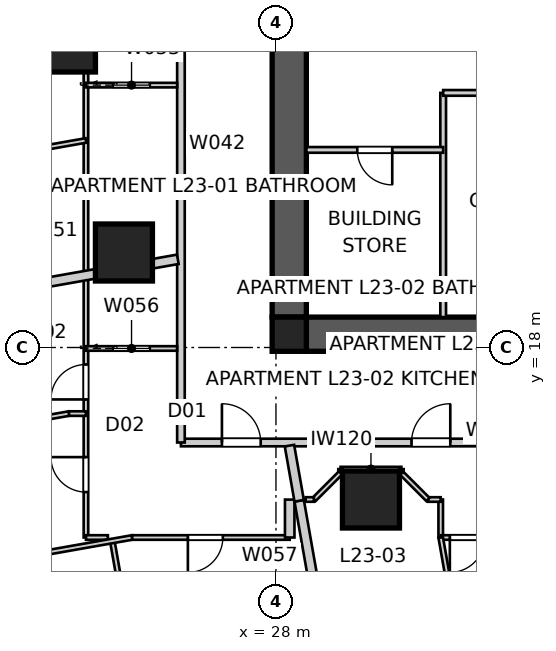
"""IFC4 building model, lengths in metres.
Left out: names, types, materials, properties, quantities, classifications, styles, units other than length and angle.
Written with IfcOpenShell. Run it as: python <this file> out.ifc"""

import sys

from ifc_helpers import new_model, si_unit, direction, frame, frame_2d, origin, origin_2d, place, context, subcontext, project, spatial, polyline, rectangle, outline, extrude, element, fill, save


model = new_model("IFC4")
c1 = context("Model", 3, precision=1e-05, world=origin(), true_north=direction((0.0, 1.0)))
c2 = subcontext(c1, "Body", "Model", "MODEL_VIEW")
j1 = project(units=[si_unit("LENGTHUNIT", "METRE"), si_unit("PLANEANGLEUNIT", "RADIAN")], contexts=[c1])
p1 = place(None, origin())
s1 = spatial("IfcSite", under=j1, at=p1, CompositionType="ELEMENT")
p2 = place(p1, origin())
s2 = spatial("IfcBuilding", under=s1, at=p2, CompositionType="ELEMENT")
p3 = place(p2, frame((0.0, 0.0, 86.2)))
s3 = spatial("IfcBuildingStorey", under=s2, at=p3, CompositionType="ELEMENT", Elevation=86.2)
p4 = place(p3, frame((51.2, 18.35, 0.0), z_axis=(0.0, 0.0, 1.0), x_axis=(-1.0, 0.0, 0.0)))
e1 = element("IfcWall", 1, at=p4, inside=s3, PredefinedType="SHEAR", context=c2, shape_type="SweptSolid", body=[
    extrude(outline(polyline([(0.0, -0.45), (22.4, -0.45), (22.4, -0.025), (22.85, -0.025), (22.85, 0.025), (22.4, 0.025), (22.4, 0.45), (0.0, 0.45), (0.0, 0.025), (-0.45, 0.025), (-0.45, -0.025), (0.0, -0.025), (0.0, -0.45)])), origin(), (0.0, 0.0, 1.0), 3.4),
])
p5 = place(p3, frame((28.35, 41.2, 0.0), z_axis=(0.0, 0.0, 1.0), x_axis=(0.0, -1.0, 0.0)))
e2 = element("IfcWall", 2, at=p5, inside=s3, PredefinedType="SHEAR", context=c2, shape_type="SweptSolid", body=[
    extrude(outline(polyline([(0.0, -0.45), (22.4, -0.45), (22.4, -0.025), (22.85, -0.025), (22.85, 0.025), (22.4, 0.025), (22.4, 0.45), (0.0, 0.45), (0.0, 0.025), (-0.45, 0.025), (-0.45, -0.025), (0.0, -0.025), (0.0, -0.45)])), origin(), (0.0, 0.0, 1.0), 3.4),
])
p6 = place(p5, frame((11.14, 0.0, 0.0)))
e3 = element("IfcOpeningElement", 3, at=p6, cuts=e2, PredefinedType="OPENING", context=c2, shape_type="SweptSolid", body=[
    extrude(rectangle(XDim=1.02, YDim=2.4, at=frame_2d((0.51, 1.2))), frame((0.0, 0.46, 0.0), z_axis=(0.0, -1.0, 0.0), x_axis=(1.0, 0.0, 0.0)), (0.0, 0.0, 1.0), 0.92),
])
p7 = place(p3, frame((28.35, 18.35, 0.0), z_axis=(0.0, 0.0, 1.0), x_axis=(1.0, 0.0, 0.0)))
e4 = element("IfcColumn", 4, at=p7, inside=s3, PredefinedType="COLUMN", context=c2, shape_type="SweptSolid", body=[
    extrude(rectangle(XDim=0.9, YDim=0.9, at=origin_2d()), origin(), (0.0, 0.0, 1.0), 3.4),
])
for number, where, z_axis, x_axis in (
    (5, (22.5, 26.0, 0.0), (0.0, 0.0, 1.0), (1.0, 0.0, 0.0)),
    (6, (24.0, 20.5, 0.0), (0.0, 0.0, 1.0), (1.0, 0.0, 0.0)),
    (7, (30.5, 14.0, 0.0), (0.0, 0.0, 1.0), (1.0, 0.0, 0.0)),
):
    element("IfcColumn", number, at=place(p3, frame(where, z_axis=z_axis, x_axis=x_axis)), inside=s3, PredefinedType="COLUMN", context=c2, shape_type="SweptSolid", body=[
        extrude(rectangle(XDim=1.5, YDim=1.5, at=origin_2d()), origin(), (0.0, 0.0, 1.0), 3.4),
    ])
p8 = place(p3, frame((25.5, 15.5, 0.0), z_axis=(0.0, 0.0, 1.0), x_axis=(1.0, 0.0, 0.0)))
e8 = element("IfcWall", 8, at=p8, inside=s3, PredefinedType="PARTITIONING", context=c2, shape_type="SweptSolid", body=[
    extrude(rectangle(XDim=29.0, YDim=0.2, at=frame_2d((14.5, 0.0))), origin(), (0.0, 0.0, 1.0), 3.25),
])
p9 = place(p8, frame((15.794, 0.0, 0.0)))
e9 = element("IfcOpeningElement", 9, at=p9, cuts=e8, PredefinedType="OPENING", context=c2, shape_type="SweptSolid", body=[
    extrude(rectangle(XDim=1.02, YDim=2.34, at=frame_2d((0.51, 1.17))), frame((0.0, 0.11, 0.0), z_axis=(0.0, -1.0, 0.0), x_axis=(1.0, 0.0, 0.0)), (0.0, 0.0, 1.0), 0.22),
])
p10 = place(p8, frame((6.067, 0.0, 0.0)))
e10 = element("IfcOpeningElement", 10, at=p10, cuts=e8, PredefinedType="OPENING", context=c2, shape_type="SweptSolid", body=[
    extrude(rectangle(XDim=1.02, YDim=2.34, at=frame_2d((0.51, 1.17))), frame((0.0, 0.11, 0.0), z_axis=(0.0, -1.0, 0.0), x_axis=(1.0, 0.0, 0.0)), (0.0, 0.0, 1.0), 0.22),
])
p11 = place(p8, frame((1.079, 0.0, 0.0)))
e11 = element("IfcOpeningElement", 11, at=p11, cuts=e8, PredefinedType="OPENING", context=c2, shape_type="SweptSolid", body=[
    extrude(rectangle(XDim=1.02, YDim=2.34, at=frame_2d((0.51, 1.17))), frame((0.0, 0.11, 0.0), z_axis=(0.0, -1.0, 0.0), x_axis=(1.0, 0.0, 0.0)), (0.0, 0.0, 1.0), 0.22),
])
p12 = place(p3, frame((25.5, 44.5, 0.0), z_axis=(0.0, 0.0, 1.0), x_axis=(0.0, -1.0, 0.0)))
e12 = element("IfcWall", 12, at=p12, inside=s3, PredefinedType="PARTITIONING", context=c2, shape_type="SweptSolid", body=[
    extrude(rectangle(XDim=29.0, YDim=0.2, at=frame_2d((14.5, 0.0))), origin(), (0.0, 0.0, 1.0), 3.25),
])
p13 = place(p12, frame((12.263, 0.0, 0.0)))
e13 = element("IfcOpeningElement", 13, at=p13, cuts=e12, PredefinedType="OPENING", context=c2, shape_type="SweptSolid", body=[
    extrude(rectangle(XDim=1.02, YDim=2.34, at=frame_2d((0.51, 1.17))), frame((0.0, 0.11, 0.0), z_axis=(0.0, -1.0, 0.0), x_axis=(1.0, 0.0, 0.0)), (0.0, 0.0, 1.0), 0.22),
])
p14 = place(p12, frame((2.018, 0.0, 0.0)))
e14 = element("IfcOpeningElement", 14, at=p14, cuts=e12, PredefinedType="OPENING", context=c2, shape_type="SweptSolid", body=[
    extrude(rectangle(XDim=1.02, YDim=2.34, at=frame_2d((0.51, 1.17))), frame((0.0, 0.11, 0.0), z_axis=(0.0, -1.0, 0.0), x_axis=(1.0, 0.0, 0.0)), (0.0, 0.0, 1.0), 0.22),
])
p15 = place(p3, frame((16.595, 18.765, 0.0), z_axis=(0.0, 0.0, 1.0), x_axis=(0.984806596137, 0.173654738504, 0.0)))
e15 = element("IfcWall", 15, at=p15, inside=s3, PredefinedType="PARTITIONING", context=c2, shape_type="SweptSolid", body=[
    extrude(rectangle(XDim=8.958, YDim=0.25, at=frame_2d((4.479, 0.0))), origin(), (0.0, 0.0, 1.0), 3.25),
])
p16 = place(p3, frame((30.38, 3.934, 0.0), z_axis=(0.0, 0.0, 1.0), x_axis=(-0.173644522411, 0.984808397525, 0.0)))
e16 = element("IfcWall", 16, at=p16, inside=s3, PredefinedType="PARTITIONING", context=c2, shape_type="SweptSolid", body=[
    extrude(rectangle(XDim=10.188, YDim=0.25, at=frame_2d((5.094, 0.0))), origin(), (0.0, 0.0, 1.0), 2.638),
])
p17 = place(p3, frame((28.611, 13.967, 0.0), z_axis=(0.0, 0.0, 1.0), x_axis=(-0.173634105885, 0.984810234143, 0.0)))
e17 = element("IfcWall", 17, at=p17, inside=s3, PredefinedType="PARTITIONING", context=c2, shape_type="SweptSolid", body=[
    extrude(rectangle(XDim=1.474, YDim=0.25, at=frame_2d((0.737, 0.0))), origin(), (0.0, 0.0, 1.0), 3.25),
])
p18 = place(p3, frame((32.4, 18.8, 0.0), z_axis=(0.0, 0.0, 1.0), x_axis=(0.0, 1.0, 0.0)))
e18 = element("IfcWall", 18, at=p18, inside=s3, PredefinedType="SOLIDWALL", context=c2, shape_type="SweptSolid", body=[
    extrude(rectangle(XDim=5.9, YDim=0.15, at=frame_2d((2.95, 0.0))), origin(), (0.0, 0.0, 1.0), 3.25),
])
p19 = place(p3, frame((32.4, 24.7, 0.0), z_axis=(0.0, 0.0, 1.0), x_axis=(1.0, 0.0, 0.0)))
e19 = element("IfcWall", 19, at=p19, inside=s3, PredefinedType="SOLIDWALL", context=c2, shape_type="SweptSolid", body=[
    extrude(rectangle(XDim=1.85, YDim=0.15, at=frame_2d((0.925, 0.0))), origin(), (0.0, 0.0, 1.0), 3.25),
])
p20 = place(p3, frame((32.4, 23.2, 0.0), z_axis=(0.0, 0.0, 1.0), x_axis=(-1.0, 0.0, 0.0)))
e20 = element("IfcWall", 20, at=p20, inside=s3, PredefinedType="SOLIDWALL", context=c2, shape_type="SweptSolid", body=[
    extrude(rectangle(XDim=3.6, YDim=0.15, at=frame_2d((1.8, 0.0))), origin(), (0.0, 0.0, 1.0), 3.25),
])
p21 = place(p20, frame((1.34, 0.0, 0.0)))
e21 = element("IfcOpeningElement", 21, at=p21, cuts=e20, PredefinedType="OPENING", context=c2, shape_type="SweptSolid", body=[
    extrude(rectangle(XDim=0.92, YDim=2.1, at=frame_2d((0.46, 1.05))), frame((0.0, 0.085, 0.0), z_axis=(0.0, -1.0, 0.0), x_axis=(1.0, 0.0, 0.0)), (0.0, 0.0, 1.0), 0.17),
])
p22 = place(p3, frame((23.0, 13.0, 0.0), z_axis=(0.0, 0.0, 1.0), x_axis=(0.0, 1.0, 0.0)))
e22 = element("IfcWall", 22, at=p22, inside=s3, PredefinedType="PARTITIONING", context=c2, shape_type="SweptSolid", body=[
    extrude(rectangle(XDim=34.0, YDim=0.12, at=frame_2d((17.0, 0.0))), origin(), (0.0, 0.0, 1.0), 2.55),
])
p23 = place(p22, frame((18.848, 0.0, 0.0)))
e23 = element("IfcOpeningElement", 23, at=p23, cuts=e22, PredefinedType="OPENING", context=c2, shape_type="SweptSolid", body=[
    extrude(rectangle(XDim=0.92, YDim=2.34, at=frame_2d((0.46, 1.17))), frame((0.0, 0.07, 0.0), z_axis=(0.0, -1.0, 0.0), x_axis=(1.0, 0.0, 0.0)), (0.0, 0.0, 1.0), 0.14),
])
p24 = place(p22, frame((16.284, 0.0, 0.0)))
e24 = element("IfcOpeningElement", 24, at=p24, cuts=e22, PredefinedType="OPENING", context=c2, shape_type="SweptSolid", body=[
    extrude(rectangle(XDim=0.92, YDim=2.34, at=frame_2d((0.46, 1.17))), frame((0.0, 0.07, 0.0), z_axis=(0.0, -1.0, 0.0), x_axis=(1.0, 0.0, 0.0)), (0.0, 0.0, 1.0), 0.14),
])
p25 = place(p22, frame((29.052, 0.0, 0.0)))
e25 = element("IfcOpeningElement", 25, at=p25, cuts=e22, PredefinedType="OPENING", context=c2, shape_type="SweptSolid", body=[
    extrude(rectangle(XDim=0.92, YDim=2.34, at=frame_2d((0.46, 1.17))), frame((0.0, 0.07, 0.0), z_axis=(0.0, -1.0, 0.0), x_axis=(1.0, 0.0, 0.0)), (0.0, 0.0, 1.0), 0.14),
])
p26 = place(p22, frame((1.196, 0.0, 0.0)))
e26 = element("IfcOpeningElement", 26, at=p26, cuts=e22, PredefinedType="OPENING", context=c2, shape_type="SweptSolid", body=[
    extrude(rectangle(XDim=0.92, YDim=2.34, at=frame_2d((0.46, 1.17))), frame((0.0, 0.07, 0.0), z_axis=(0.0, -1.0, 0.0), x_axis=(1.0, 0.0, 0.0)), (0.0, 0.0, 1.0), 0.14),
])
p27 = place(p22, frame((3.633, 0.0, 0.0)))
e27 = element("IfcOpeningElement", 27, at=p27, cuts=e22, PredefinedType="OPENING", context=c2, shape_type="SweptSolid", body=[
    extrude(rectangle(XDim=0.92, YDim=2.34, at=frame_2d((0.46, 1.17))), frame((0.0, 0.07, 0.0), z_axis=(0.0, -1.0, 0.0), x_axis=(1.0, 0.0, 0.0)), (0.0, 0.0, 1.0), 0.14),
])
p28 = place(p22, frame((23.619, 0.0, 0.0)))
e28 = element("IfcOpeningElement", 28, at=p28, cuts=e22, PredefinedType="OPENING", context=c2, shape_type="SweptSolid", body=[
    extrude(rectangle(XDim=0.96, YDim=2.1, at=frame_2d((0.48, 1.05))), frame((0.0, 0.07, 0.0), z_axis=(0.0, -1.0, 0.0), x_axis=(1.0, 0.0, 0.0)), (0.0, 0.0, 1.0), 0.14),
])
p29 = place(p3, frame((23.0, 24.905, 0.0), z_axis=(0.0, 0.0, 1.0), x_axis=(1.0, 0.0, 0.0)))
e29 = element("IfcWall", 29, at=p29, inside=s3, PredefinedType="PARTITIONING", context=c2, shape_type="SweptSolid", body=[
    extrude(rectangle(XDim=2.4, YDim=0.12, at=frame_2d((1.2, 0.0))), origin(), (0.0, 0.0, 1.0), 3.25),
])
p30 = place(p29, frame((0.72, 0.0, 0.0)))
e30 = element("IfcOpeningElement", 30, at=p30, cuts=e29, PredefinedType="OPENING", context=c2, shape_type="SweptSolid", body=[
    extrude(rectangle(XDim=0.96, YDim=2.1, at=frame_2d((0.48, 1.05))), frame((0.0, 0.07, 0.0), z_axis=(0.0, -1.0, 0.0), x_axis=(1.0, 0.0, 0.0)), (0.0, 0.0, 1.0), 0.14),
])
p31 = place(p3, frame((23.0, 23.448, 0.0), z_axis=(0.0, 0.0, 1.0), x_axis=(-0.984809234282, -0.173639776761, 0.0)))
e31 = element("IfcWall", 31, at=p31, inside=s3, PredefinedType="PARTITIONING", context=c2, shape_type="SweptSolid", body=[
    extrude(rectangle(XDim=7.081, YDim=0.12, at=frame_2d((3.541, 0.0))), origin(), (0.0, 0.0, 1.0), 3.25),
])
p32 = place(p31, frame((3.1, 0.0, 0.0)))
e32 = element("IfcOpeningElement", 32, at=p32, cuts=e31, PredefinedType="OPENING", context=c2, shape_type="SweptSolid", body=[
    extrude(rectangle(XDim=0.92, YDim=2.34, at=frame_2d((0.46, 1.17))), frame((0.0, 0.07, 0.0), z_axis=(0.0, -1.0, 0.0), x_axis=(1.0, 0.0, 0.0)), (0.0, 0.0, 1.0), 0.14),
])
p33 = place(p3, frame((23.0, 17.975, 0.0), z_axis=(0.0, 0.0, 1.0), x_axis=(1.0, 0.0, 0.0)))
e33 = element("IfcWall", 33, at=p33, inside=s3, PredefinedType="PARTITIONING", context=c2, shape_type="SweptSolid", body=[
    extrude(rectangle(XDim=2.4, YDim=0.12, at=frame_2d((1.2, 0.0))), origin(), (0.0, 0.0, 1.0), 3.25),
])
p34 = place(p33, frame((0.72, 0.0, 0.0)))
e34 = element("IfcOpeningElement", 34, at=p34, cuts=e33, PredefinedType="OPENING", context=c2, shape_type="SweptSolid", body=[
    extrude(rectangle(XDim=0.96, YDim=2.1, at=frame_2d((0.48, 1.05))), frame((0.0, 0.07, 0.0), z_axis=(0.0, -1.0, 0.0), x_axis=(1.0, 0.0, 0.0)), (0.0, 0.0, 1.0), 0.14),
])
p35 = place(p3, frame((28.362, 13.0, 0.0), z_axis=(0.0, 0.0, 1.0), x_axis=(-1.0, 0.0, 0.0)))
e35 = element("IfcWall", 35, at=p35, inside=s3, PredefinedType="PARTITIONING", context=c2, shape_type="SweptSolid", body=[
    extrude(rectangle(XDim=4.151, YDim=0.12, at=frame_2d((2.076, 0.0))), origin(), (0.0, 0.0, 1.0), 2.638),
])
p36 = place(p35, frame((1.76, 0.0, 0.0)))
e36 = element("IfcOpeningElement", 36, at=p36, cuts=e35, PredefinedType="OPENING", context=c2, shape_type="SweptSolid", body=[
    extrude(rectangle(XDim=0.92, YDim=2.34, at=frame_2d((0.46, 1.17))), frame((0.0, 0.07, 0.0), z_axis=(0.0, -1.0, 0.0), x_axis=(1.0, 0.0, 0.0)), (0.0, 0.0, 1.0), 0.14),
])
p37 = place(p3, frame((28.362, 13.998, 0.0), z_axis=(0.0, 0.0, 1.0), x_axis=(0.0, -1.0, 0.0)))
e37 = element("IfcWall", 37, at=p37, inside=s3, PredefinedType="PARTITIONING", context=c2, shape_type="SweptSolid", body=[
    extrude(rectangle(XDim=0.998, YDim=0.25, at=frame_2d((0.499, 0.0))), origin(), (0.0, 0.0, 1.0), 3.25),
])
p38 = place(p3, frame((25.597, 2.115, 0.0), z_axis=(0.0, 0.0, 1.0), x_axis=(-0.173639194339, 0.984809336973, 0.0)))
e38 = element("IfcWall", 38, at=p38, inside=s3, PredefinedType="PARTITIONING", context=c2, shape_type="SweptSolid", body=[
    extrude(rectangle(XDim=10.96, YDim=0.12, at=frame_2d((5.48, 0.0))), origin(), (0.0, 0.0, 1.0), 3.25),
])
p39 = place(p38, frame((3.275, 0.0, 0.0)))
e39 = element("IfcOpeningElement", 39, at=p39, cuts=e38, PredefinedType="OPENING", context=c2, shape_type="SweptSolid", body=[
    extrude(rectangle(XDim=0.92, YDim=2.34, at=frame_2d((0.46, 1.17))), frame((0.0, 0.07, 0.0), z_axis=(0.0, -1.0, 0.0), x_axis=(1.0, 0.0, 0.0)), (0.0, 0.0, 1.0), 0.14),
])
p40 = place(p38, frame((8.725, 0.0, 0.0)))
e40 = element("IfcOpeningElement", 40, at=p40, cuts=e38, PredefinedType="OPENING", context=c2, shape_type="SweptSolid", body=[
    extrude(rectangle(XDim=0.92, YDim=2.34, at=frame_2d((0.46, 1.17))), frame((0.0, 0.07, 0.0), z_axis=(0.0, -1.0, 0.0), x_axis=(1.0, 0.0, 0.0)), (0.0, 0.0, 1.0), 0.14),
])
p41 = place(p3, frame((17.85, 11.878, 0.0), z_axis=(0.0, 0.0, 1.0), x_axis=(0.984806762864, 0.173653792983, 0.0)))
e41 = element("IfcWall", 41, at=p41, inside=s3, PredefinedType="PARTITIONING", context=c2, shape_type="SweptSolid", body=[
    extrude(rectangle(XDim=6.459, YDim=0.12, at=frame_2d((3.229, 0.0))), origin(), (0.0, 0.0, 1.0), 2.638),
])
p42 = place(p3, frame((23.0, 16.261, 0.0), z_axis=(0.0, 0.0, 1.0), x_axis=(-1.0, 0.0, 0.0)))
e42 = element("IfcWall", 42, at=p42, inside=s3, PredefinedType="PARTITIONING", context=c2, shape_type="SweptSolid", body=[
    extrude(rectangle(XDim=0.45, YDim=0.12, at=frame_2d((0.225, 0.0))), origin(), (0.0, 0.0, 1.0), 3.25),
])
p43 = place(p3, frame((22.55, 16.261, 0.0), z_axis=(0.0, 0.0, 1.0), x_axis=(-0.984810453076, -0.173632864151, 0.0)))
e43 = element("IfcWall", 43, at=p43, inside=s3, PredefinedType="PARTITIONING", context=c2, shape_type="SweptSolid", body=[
    extrude(rectangle(XDim=5.389, YDim=0.12, at=frame_2d((2.695, 0.0))), origin(), (0.0, 0.0, 1.0), 3.25),
])
p44 = place(p3, frame((32.336, 13.0, 0.0), z_axis=(0.0, 0.0, 1.0), x_axis=(0.0, 1.0, 0.0)))
e44 = element("IfcWall", 44, at=p44, inside=s3, PredefinedType="PARTITIONING", context=c2, shape_type="SweptSolid", body=[
    extrude(rectangle(XDim=1.0, YDim=0.12, at=frame_2d((0.5, 0.0))), origin(), (0.0, 0.0, 1.0), 3.25),
])
p45 = place(p3, frame((32.336, 14.0, 0.0), z_axis=(0.0, 0.0, 1.0), x_axis=(-1.0, 0.0, 0.0)))
e45 = element("IfcWall", 45, at=p45, inside=s3, PredefinedType="PARTITIONING", context=c2, shape_type="SweptSolid", body=[
    extrude(rectangle(XDim=0.336, YDim=0.12, at=frame_2d((0.168, 0.0))), origin(), (0.0, 0.0, 1.0), 3.25),
])
p46 = place(p3, frame((32.0, 14.0, 0.0), z_axis=(0.0, 0.0, 1.0), x_axis=(-0.707106781187, 0.707106781187, 0.0)))
e46 = element("IfcWall", 46, at=p46, inside=s3, PredefinedType="PARTITIONING", context=c2, shape_type="SweptSolid", body=[
    extrude(rectangle(XDim=0.99, YDim=0.12, at=frame_2d((0.495, 0.0))), origin(), (0.0, 0.0, 1.0), 3.25),
])
p47 = place(p3, frame((31.3, 14.8, 0.0), z_axis=(0.0, 0.0, 1.0), x_axis=(-1.0, 0.0, 0.0)))
e47 = element("IfcWall", 47, at=p47, inside=s3, PredefinedType="PARTITIONING", context=c2, shape_type="SweptSolid", body=[
    extrude(rectangle(XDim=1.6, YDim=0.12, at=frame_2d((0.8, 0.0))), origin(), (0.0, 0.0, 1.0), 3.25),
])
p48 = place(p3, frame((29.7, 14.7, 0.0), z_axis=(0.0, 0.0, 1.0), x_axis=(-0.707106781187, -0.707106781187, 0.0)))
e48 = element("IfcWall", 48, at=p48, inside=s3, PredefinedType="PARTITIONING", context=c2, shape_type="SweptSolid", body=[
    extrude(rectangle(XDim=0.99, YDim=0.12, at=frame_2d((0.495, 0.0))), origin(), (0.0, 0.0, 1.0), 3.25),
])
p49 = place(p3, frame((29.0, 14.0, 0.0), z_axis=(0.0, 0.0, 1.0), x_axis=(-1.0, 0.0, 0.0)))
e49 = element("IfcWall", 49, at=p49, inside=s3, PredefinedType="PARTITIONING", context=c2, shape_type="SweptSolid", body=[
    extrude(rectangle(XDim=0.219, YDim=0.12, at=frame_2d((0.109, 0.0))), origin(), (0.0, 0.0, 1.0), 3.25),
])
p50 = place(p3, frame((50.105, 13.0, 0.0), z_axis=(0.0, 0.0, 1.0), x_axis=(-1.0, 0.0, 0.0)))
e50 = element("IfcWall", 50, at=p50, inside=s3, PredefinedType="PARTITIONING", context=c2, shape_type="SweptSolid", body=[
    extrude(rectangle(XDim=17.77, YDim=0.12, at=frame_2d((8.885, 0.0))), origin(), (0.0, 0.0, 1.0), 2.55),
])
p51 = place(p50, frame((7.626, 0.0, 0.0)))
e51 = element("IfcOpeningElement", 51, at=p51, cuts=e50, PredefinedType="OPENING", context=c2, shape_type="SweptSolid", body=[
    extrude(rectangle(XDim=0.92, YDim=2.34, at=frame_2d((0.46, 1.17))), frame((0.0, 0.07, 0.0), z_axis=(0.0, -1.0, 0.0), x_axis=(1.0, 0.0, 0.0)), (0.0, 0.0, 1.0), 0.14),
])
p52 = place(p50, frame((16.61, 0.0, 0.0)))
e52 = element("IfcOpeningElement", 52, at=p52, cuts=e50, PredefinedType="OPENING", context=c2, shape_type="SweptSolid", body=[
    extrude(rectangle(XDim=0.92, YDim=2.34, at=frame_2d((0.46, 1.17))), frame((0.0, 0.07, 0.0), z_axis=(0.0, -1.0, 0.0), x_axis=(1.0, 0.0, 0.0)), (0.0, 0.0, 1.0), 0.14),
])
p53 = place(p3, frame((32.336, 13.0, 0.0), z_axis=(0.0, 0.0, 1.0), x_axis=(0.173624894944, -0.984811858101, 0.0)))
e53 = element("IfcWall", 53, at=p53, inside=s3, PredefinedType="PARTITIONING", context=c2, shape_type="SweptSolid", body=[
    extrude(rectangle(XDim=9.549, YDim=0.12, at=frame_2d((4.774, 0.0))), origin(), (0.0, 0.0, 1.0), 3.25),
])
p54 = place(p53, frame((4.334, 0.0, 0.0)))
e54 = element("IfcOpeningElement", 54, at=p54, cuts=e53, PredefinedType="OPENING", context=c2, shape_type="SweptSolid", body=[
    extrude(rectangle(XDim=0.92, YDim=2.34, at=frame_2d((0.46, 1.17))), frame((0.0, 0.07, 0.0), z_axis=(0.0, -1.0, 0.0), x_axis=(1.0, 0.0, 0.0)), (0.0, 0.0, 1.0), 0.14),
])
p55 = place(p3, frame((23.0, 13.0, 0.0), z_axis=(0.0, 0.0, 1.0), x_axis=(1.0, 0.0, 0.0)))
e55 = element("IfcWall", 55, at=p55, inside=s3, PredefinedType="PARTITIONING", context=c2, shape_type="SweptSolid", body=[
    extrude(rectangle(XDim=0.578, YDim=0.12, at=frame_2d((0.289, 0.0))), origin(), (0.0, 0.0, 1.0), 3.25),
])
for number, where, z_axis, x_axis in (
    (56, (31.3, 14.8, 0.0), (0.0, 0.0, 1.0), (0.0, -1.0, 0.0)),
    (57, (29.7, 14.8, 0.0), (0.0, 0.0, 1.0), (0.0, -1.0, 0.0)),
):
    element("IfcWall", number, at=place(p3, frame(where, z_axis=z_axis, x_axis=x_axis)), inside=s3, PredefinedType="PARTITIONING", context=c2, shape_type="SweptSolid", body=[
        extrude(rectangle(XDim=0.1, YDim=0.12, at=frame_2d((0.05, 0.0))), origin(), (0.0, 0.0, 1.0), 3.25),
    ])
p56 = place(p10, origin())
e58 = element("IfcDoor", 58, at=p56, inside=s3, OperationType="SINGLE_SWING_RIGHT", PredefinedType="DOOR", context=c2, shape_type="SweptSolid", body=[
    extrude(rectangle(XDim=1.02, YDim=2.34, at=frame_2d((0.51, 1.17))), frame((0.0, 0.025, 0.0), z_axis=(0.0, -1.0, 0.0), x_axis=(1.0, 0.0, 0.0)), (0.0, 0.0, 1.0), 0.05),
])
fill(e10, e58)
p57 = place(p11, origin())
e59 = element("IfcDoor", 59, at=p57, inside=s3, OperationType="SINGLE_SWING_LEFT", PredefinedType="DOOR", context=c2, shape_type="SweptSolid", body=[
    extrude(rectangle(XDim=1.02, YDim=2.34, at=frame_2d((0.51, 1.17))), frame((0.0, 0.025, 0.0), z_axis=(0.0, -1.0, 0.0), x_axis=(1.0, 0.0, 0.0)), (0.0, 0.0, 1.0), 0.05),
])
fill(e11, e59)
p58 = place(p21, origin())
e60 = element("IfcDoor", 60, at=p58, inside=s3, OperationType="SINGLE_SWING_LEFT", PredefinedType="DOOR", context=c2, shape_type="SweptSolid", body=[
    extrude(rectangle(XDim=0.92, YDim=2.1, at=frame_2d((0.46, 1.05))), frame((0.0, 0.025, 0.0), z_axis=(0.0, -1.0, 0.0), x_axis=(1.0, 0.0, 0.0)), (0.0, 0.0, 1.0), 0.05),
])
fill(e21, e60)
p59 = place(p52, origin())
e61 = element("IfcDoor", 61, at=p59, inside=s3, OperationType="SINGLE_SWING_RIGHT", PredefinedType="DOOR", context=c2, shape_type="SweptSolid", body=[
    extrude(rectangle(XDim=0.92, YDim=2.34, at=frame_2d((0.46, 1.17))), frame((0.0, 0.025, 0.0), z_axis=(0.0, -1.0, 0.0), x_axis=(1.0, 0.0, 0.0)), (0.0, 0.0, 1.0), 0.05),
])
fill(e52, e61)
p60 = place(p36, origin())
e62 = element("IfcDoor", 62, at=p60, inside=s3, OperationType="SINGLE_SWING_RIGHT", PredefinedType="DOOR", context=c2, shape_type="SweptSolid", body=[
    extrude(rectangle(XDim=0.92, YDim=2.34, at=frame_2d((0.46, 1.17))), frame((0.0, 0.025, 0.0), z_axis=(0.0, -1.0, 0.0), x_axis=(1.0, 0.0, 0.0)), (0.0, 0.0, 1.0), 0.05),
])
fill(e36, e62)
p61 = place(p26, origin())
e63 = element("IfcDoor", 63, at=p61, inside=s3, OperationType="SINGLE_SWING_RIGHT", PredefinedType="DOOR", context=c2, shape_type="SweptSolid", body=[
    extrude(rectangle(XDim=0.92, YDim=2.34, at=frame_2d((0.46, 1.17))), frame((0.0, 0.025, 0.0), z_axis=(0.0, -1.0, 0.0), x_axis=(1.0, 0.0, 0.0)), (0.0, 0.0, 1.0), 0.05),
])
fill(e26, e63)
p62 = place(p34, origin())
e64 = element("IfcDoor", 64, at=p62, inside=s3, OperationType="SLIDING_TO_LEFT", PredefinedType="DOOR", context=c2, shape_type="SweptSolid", body=[
    extrude(rectangle(XDim=0.96, YDim=2.1, at=frame_2d((0.48, 1.05))), frame((0.0, 0.025, 0.0), z_axis=(0.0, -1.0, 0.0), x_axis=(1.0, 0.0, 0.0)), (0.0, 0.0, 1.0), 0.05),
])
fill(e34, e64)
p63 = place(p27, origin())
e65 = element("IfcDoor", 65, at=p63, inside=s3, OperationType="SINGLE_SWING_LEFT", PredefinedType="DOOR", context=c2, shape_type="SweptSolid", body=[
    extrude(rectangle(XDim=0.92, YDim=2.34, at=frame_2d((0.46, 1.17))), frame((0.0, 0.025, 0.0), z_axis=(0.0, -1.0, 0.0), x_axis=(1.0, 0.0, 0.0)), (0.0, 0.0, 1.0), 0.05),
])
fill(e27, e65)
p64 = place(p30, origin())
e66 = element("IfcDoor", 66, at=p64, inside=s3, OperationType="SLIDING_TO_LEFT", PredefinedType="DOOR", context=c2, shape_type="SweptSolid", body=[
    extrude(rectangle(XDim=0.96, YDim=2.1, at=frame_2d((0.48, 1.05))), frame((0.0, 0.025, 0.0), z_axis=(0.0, -1.0, 0.0), x_axis=(1.0, 0.0, 0.0)), (0.0, 0.0, 1.0), 0.05),
])
fill(e30, e66)
save(model, sys.argv[1])
